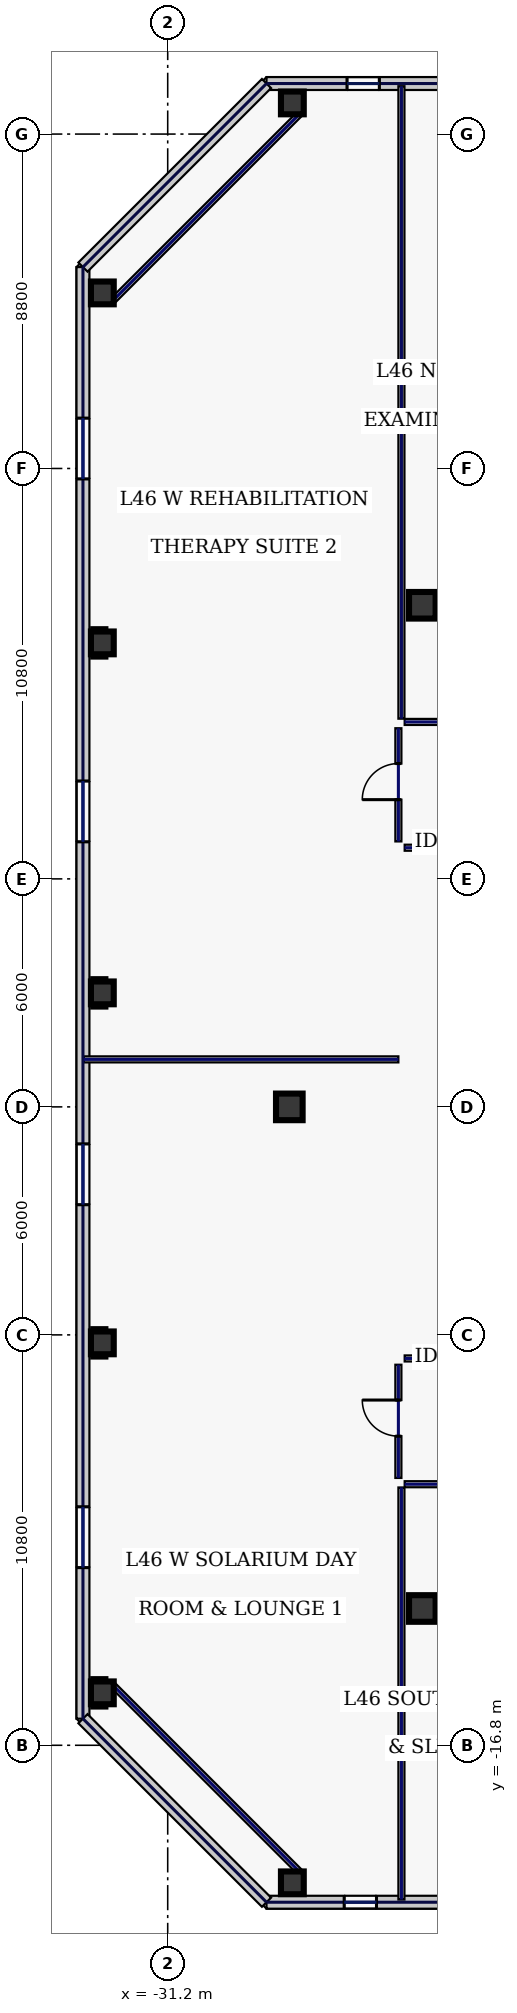
"""IFC4 building model, lengths in metres.
Left out: names, types, materials, properties, quantities, classifications, styles, units other than length and angle.
Written with IfcOpenShell. Run it as: python <this file> out.ifc"""

import sys

from ifc_helpers import new_model, si_unit, direction, frame, frame_2d, origin, origin_2d, place, context, subcontext, project, spatial, rectangle, hollow_rectangle, extrude, element, fill, save


model = new_model("IFC4")
c1 = context("Model", 3, precision=1e-05, world=origin(), true_north=direction((0.0, 1.0)))
c2 = subcontext(c1, "Body", "Model", "MODEL_VIEW")
j1 = project(units=[si_unit("LENGTHUNIT", "METRE"), si_unit("PLANEANGLEUNIT", "RADIAN")], contexts=[c1])
p1 = place(None, origin())
s1 = spatial("IfcSite", under=j1, at=p1, CompositionType="ELEMENT")
p2 = place(p1, origin())
s2 = spatial("IfcBuilding", under=s1, at=p2, CompositionType="ELEMENT")
p3 = place(p2, frame((0.0, 0.0, 200.2)))
s3 = spatial("IfcBuildingStorey", under=s2, at=p3, CompositionType="ELEMENT", Elevation=200.2)
for number, where, z_axis, x_axis in (
    (1, (-24.5, -13.2, 0.0), (0.0, 0.0, 1.0), (1.0, 0.0, 0.0)),
    (2, (-24.5, 13.2, 0.0), (0.0, 0.0, 1.0), (1.0, 0.0, 0.0)),
    (3, (-28.0, 0.0, 0.0), (0.0, 0.0, 1.0), (1.0, 0.0, 0.0)),
):
    element("IfcColumn", number, at=place(p3, frame(where, z_axis=z_axis, x_axis=x_axis)), inside=s3, PredefinedType="COLUMN", context=c2, shape_type="SweptSolid", body=[
        extrude(hollow_rectangle(XDim=0.7, YDim=0.7, WallThickness=0.032, at=origin_2d()), origin(), (0.0, 0.0, 1.0), 3.74),
    ])
for number, where, z_axis, x_axis in (
    (4, (-27.92, -20.42, 0.0), (0.0, 0.0, 1.0), (1.0, 0.0, 0.0)),
    (5, (-27.92, 26.42, 0.0), (0.0, 0.0, 1.0), (1.0, 0.0, 0.0)),
    (6, (-32.92, 21.42, 0.0), (0.0, 0.0, 1.0), (1.0, 0.0, 0.0)),
    (7, (-32.92, 12.21, 0.0), (0.0, 0.0, 1.0), (1.0, 0.0, 0.0)),
    (8, (-32.92, 3.0, 0.0), (0.0, 0.0, 1.0), (1.0, 0.0, 0.0)),
    (9, (-32.92, -6.21, 0.0), (0.0, 0.0, 1.0), (1.0, 0.0, 0.0)),
    (10, (-32.92, -15.42, 0.0), (0.0, 0.0, 1.0), (1.0, 0.0, 0.0)),
):
    element("IfcColumn", number, at=place(p3, frame(where, z_axis=z_axis, x_axis=x_axis)), inside=s3, PredefinedType="COLUMN", context=c2, shape_type="SweptSolid", body=[
        extrude(hollow_rectangle(XDim=0.6, YDim=0.6, WallThickness=0.028, at=origin_2d()), origin(), (0.0, 0.0, 1.0), 3.74),
    ])
p4 = place(p3, frame((-28.6, -20.93, 0.0), z_axis=(0.0, 0.0, 1.0), x_axis=(1.0, 0.0, 0.0)))
e11 = element("IfcWall", 11, at=p4, inside=s3, PredefinedType="STANDARD", context=c2, shape_type="SweptSolid", body=[
    extrude(rectangle(XDim=19.937, YDim=0.34, at=frame_2d((9.969, 0.0))), origin(), (0.0, 0.0, 1.0), 3.74),
])
p5 = place(p4, frame((2.044, 0.0, 0.8)))
e12 = element("IfcOpeningElement", 12, at=p5, cuts=e11, PredefinedType="OPENING", context=c2, shape_type="SweptSolid", body=[
    extrude(rectangle(XDim=0.85, YDim=1.85, at=frame_2d((0.425, 0.925))), frame((0.0, 0.18, 0.0), z_axis=(0.0, -1.0, 0.0), x_axis=(1.0, 0.0, 0.0)), (0.0, 0.0, 1.0), 0.36),
])
p6 = place(p4, frame((6.029, 0.0, 0.8)))
e13 = element("IfcOpeningElement", 13, at=p6, cuts=e11, PredefinedType="OPENING", context=c2, shape_type="SweptSolid", body=[
    extrude(rectangle(XDim=0.85, YDim=1.85, at=frame_2d((0.425, 0.925))), frame((0.0, 0.18, 0.0), z_axis=(0.0, -1.0, 0.0), x_axis=(1.0, 0.0, 0.0)), (0.0, 0.0, 1.0), 0.36),
])
p7 = place(p4, frame((10.707, 0.0, 0.8)))
e14 = element("IfcOpeningElement", 14, at=p7, cuts=e11, PredefinedType="OPENING", context=c2, shape_type="SweptSolid", body=[
    extrude(rectangle(XDim=1.95, YDim=2.1, at=frame_2d((0.975, 1.05))), frame((0.0, 0.18, 0.0), z_axis=(0.0, -1.0, 0.0), x_axis=(1.0, 0.0, 0.0)), (0.0, 0.0, 1.0), 0.36),
])
p8 = place(p3, frame((-8.663, 26.93, 0.0), z_axis=(0.0, 0.0, 1.0), x_axis=(-1.0, 0.0, 0.0)))
e15 = element("IfcWall", 15, at=p8, inside=s3, PredefinedType="STANDARD", context=c2, shape_type="SweptSolid", body=[
    extrude(rectangle(XDim=19.937, YDim=0.34, at=frame_2d((9.969, 0.0))), origin(), (0.0, 0.0, 1.0), 3.74),
])
p9 = place(p8, frame((16.968, 0.0, 0.7)))
e16 = element("IfcOpeningElement", 16, at=p9, cuts=e15, PredefinedType="OPENING", context=c2, shape_type="SweptSolid", body=[
    extrude(rectangle(XDim=0.85, YDim=1.85, at=frame_2d((0.425, 0.925))), frame((0.0, 0.18, 0.0), z_axis=(0.0, -1.0, 0.0), x_axis=(1.0, 0.0, 0.0)), (0.0, 0.0, 1.0), 0.36),
])
p10 = place(p8, frame((12.983, 0.0, 0.7)))
e17 = element("IfcOpeningElement", 17, at=p10, cuts=e15, PredefinedType="OPENING", context=c2, shape_type="SweptSolid", body=[
    extrude(rectangle(XDim=0.85, YDim=1.85, at=frame_2d((0.425, 0.925))), frame((0.0, 0.18, 0.0), z_axis=(0.0, -1.0, 0.0), x_axis=(1.0, 0.0, 0.0)), (0.0, 0.0, 1.0), 0.36),
])
p11 = place(p8, frame((7.355, 0.0, 0.7)))
e18 = element("IfcOpeningElement", 18, at=p11, cuts=e15, PredefinedType="OPENING", context=c2, shape_type="SweptSolid", body=[
    extrude(rectangle(XDim=1.8, YDim=2.2, at=frame_2d((0.9, 1.1))), frame((0.0, 0.18, 0.0), z_axis=(0.0, -1.0, 0.0), x_axis=(1.0, 0.0, 0.0)), (0.0, 0.0, 1.0), 0.36),
])
p12 = place(p3, frame((-33.43, 22.1, 0.0), z_axis=(0.0, 0.0, 1.0), x_axis=(0.0, -1.0, 0.0)))
e19 = element("IfcWall", 19, at=p12, inside=s3, PredefinedType="STANDARD", context=c2, shape_type="SweptSolid", body=[
    extrude(rectangle(XDim=38.2, YDim=0.34, at=frame_2d((19.1, 0.0))), origin(), (0.0, 0.0, 1.0), 3.74),
])
p13 = place(p12, frame((3.975, 0.0, 0.58)))
e20 = element("IfcOpeningElement", 20, at=p13, cuts=e19, PredefinedType="OPENING", context=c2, shape_type="SweptSolid", body=[
    extrude(rectangle(XDim=1.6, YDim=2.3, at=frame_2d((0.8, 1.15))), frame((0.0, 0.18, 0.0), z_axis=(0.0, -1.0, 0.0), x_axis=(1.0, 0.0, 0.0)), (0.0, 0.0, 1.0), 0.36),
])
p14 = place(p12, frame((13.525, 0.0, 0.58)))
e21 = element("IfcOpeningElement", 21, at=p14, cuts=e19, PredefinedType="OPENING", context=c2, shape_type="SweptSolid", body=[
    extrude(rectangle(XDim=1.6, YDim=2.3, at=frame_2d((0.8, 1.15))), frame((0.0, 0.18, 0.0), z_axis=(0.0, -1.0, 0.0), x_axis=(1.0, 0.0, 0.0)), (0.0, 0.0, 1.0), 0.36),
])
p15 = place(p12, frame((23.075, 0.0, 0.58)))
e22 = element("IfcOpeningElement", 22, at=p15, cuts=e19, PredefinedType="OPENING", context=c2, shape_type="SweptSolid", body=[
    extrude(rectangle(XDim=1.6, YDim=2.3, at=frame_2d((0.8, 1.15))), frame((0.0, 0.18, 0.0), z_axis=(0.0, -1.0, 0.0), x_axis=(1.0, 0.0, 0.0)), (0.0, 0.0, 1.0), 0.36),
])
p16 = place(p12, frame((32.625, 0.0, 0.58)))
e23 = element("IfcOpeningElement", 23, at=p16, cuts=e19, PredefinedType="OPENING", context=c2, shape_type="SweptSolid", body=[
    extrude(rectangle(XDim=1.6, YDim=2.3, at=frame_2d((0.8, 1.15))), frame((0.0, 0.18, 0.0), z_axis=(0.0, -1.0, 0.0), x_axis=(1.0, 0.0, 0.0)), (0.0, 0.0, 1.0), 0.36),
])
for number, where, z_axis, x_axis in (
    (24, (-28.6, 26.93, 0.0), (0.0, 0.0, 1.0), (-0.707, -0.707, 0.0)),
    (25, (-33.43, -16.1, 0.0), (0.0, 0.0, 1.0), (0.707, -0.707, 0.0)),
):
    element("IfcWall", number, at=place(p3, frame(where, z_axis=z_axis, x_axis=x_axis)), inside=s3, PredefinedType="STANDARD", context=c2, shape_type="SweptSolid", body=[
        extrude(rectangle(XDim=6.83, YDim=0.34, at=frame_2d((3.415, 0.0))), origin(), (0.0, 0.0, 1.0), 3.74),
    ])
for number, where, z_axis, x_axis in (
    (26, (-27.68, 26.18, 0.0), (0.0, 0.0, 1.0), (-0.707, -0.707, 0.0)),
    (27, (-32.68, -15.18, 0.0), (0.0, 0.0, 1.0), (0.707, -0.707, 0.0)),
):
    element("IfcWall", number, at=place(p3, frame(where, z_axis=z_axis, x_axis=x_axis)), inside=s3, PredefinedType="PARTITIONING", context=c2, shape_type="SweptSolid", body=[
        extrude(rectangle(XDim=7.071, YDim=0.16, at=frame_2d((3.536, 0.0))), origin(), (0.0, 0.0, 1.0), 3.74),
    ])
p17 = place(p3, frame((-25.13, -9.765, 0.0), z_axis=(0.0, 0.0, 1.0), x_axis=(0.0, 1.0, 0.0)))
e28 = element("IfcWall", 28, at=p17, inside=s3, PredefinedType="PARTITIONING", context=c2, shape_type="SweptSolid", body=[
    extrude(rectangle(XDim=2.98, YDim=0.16, at=frame_2d((1.49, 0.0))), origin(), (0.0, 0.0, 1.0), 3.74),
])
p18 = place(p17, frame((1.1, 0.0, 0.0)))
e29 = element("IfcOpeningElement", 29, at=p18, cuts=e28, PredefinedType="OPENING", context=c2, shape_type="SweptSolid", body=[
    extrude(rectangle(XDim=0.95, YDim=2.2, at=frame_2d((0.475, 1.1))), frame((0.0, 0.09, 0.0), z_axis=(0.0, -1.0, 0.0), x_axis=(1.0, 0.0, 0.0)), (0.0, 0.0, 1.0), 0.18),
])
for number, where, z_axis, x_axis in (
    (30, (-24.965, -6.62, 0.0), (0.0, 0.0, 1.0), (1.0, 0.0, 0.0)),
    (31, (-10.63, 6.82, 0.0), (0.0, 0.0, 1.0), (-1.0, 0.0, 0.0)),
):
    element("IfcWall", number, at=place(p3, frame(where, z_axis=z_axis, x_axis=x_axis)), inside=s3, PredefinedType="PARTITIONING", context=c2, shape_type="SweptSolid", body=[
        extrude(rectangle(XDim=14.335, YDim=0.16, at=frame_2d((7.167, 0.0))), origin(), (0.0, 0.0, 1.0), 3.74),
    ])
p19 = place(p3, frame((-25.13, 6.985, 0.0), z_axis=(0.0, 0.0, 1.0), x_axis=(0.0, 1.0, 0.0)))
e32 = element("IfcWall", 32, at=p19, inside=s3, PredefinedType="PARTITIONING", context=c2, shape_type="SweptSolid", body=[
    extrude(rectangle(XDim=2.98, YDim=0.16, at=frame_2d((1.49, 0.0))), origin(), (0.0, 0.0, 1.0), 3.74),
])
p20 = place(p19, frame((1.1, 0.0, 0.0)))
e33 = element("IfcOpeningElement", 33, at=p20, cuts=e32, PredefinedType="OPENING", context=c2, shape_type="SweptSolid", body=[
    extrude(rectangle(XDim=0.95, YDim=2.2, at=frame_2d((0.475, 1.1))), frame((0.0, 0.09, 0.0), z_axis=(0.0, -1.0, 0.0), x_axis=(1.0, 0.0, 0.0)), (0.0, 0.0, 1.0), 0.18),
])
p21 = place(p3, frame((-24.965, 10.13, 0.0), z_axis=(0.0, 0.0, 1.0), x_axis=(1.0, 0.0, 0.0)))
e34 = element("IfcWall", 34, at=p21, inside=s3, PredefinedType="PARTITIONING", context=c2, shape_type="SweptSolid", body=[
    extrude(rectangle(XDim=49.93, YDim=0.16, at=frame_2d((24.965, 0.0))), origin(), (0.0, 0.0, 1.0), 3.74),
])
p22 = place(p21, frame((2.044, 0.0, 0.0)))
e35 = element("IfcOpeningElement", 35, at=p22, cuts=e34, PredefinedType="OPENING", context=c2, shape_type="SweptSolid", body=[
    extrude(rectangle(XDim=0.95, YDim=2.2, at=frame_2d((0.475, 1.1))), frame((0.0, 0.09, 0.0), z_axis=(0.0, -1.0, 0.0), x_axis=(1.0, 0.0, 0.0)), (0.0, 0.0, 1.0), 0.18),
])
p23 = place(p21, frame((7.775, 0.0, 0.0)))
e36 = element("IfcOpeningElement", 36, at=p23, cuts=e34, PredefinedType="OPENING", context=c2, shape_type="SweptSolid", body=[
    extrude(rectangle(XDim=0.95, YDim=2.2, at=frame_2d((0.475, 1.1))), frame((0.0, 0.09, 0.0), z_axis=(0.0, -1.0, 0.0), x_axis=(1.0, 0.0, 0.0)), (0.0, 0.0, 1.0), 0.18),
])
p24 = place(p21, frame((15.275, 0.0, 0.0)))
e37 = element("IfcOpeningElement", 37, at=p24, cuts=e34, PredefinedType="OPENING", context=c2, shape_type="SweptSolid", body=[
    extrude(rectangle(XDim=0.95, YDim=2.2, at=frame_2d((0.475, 1.1))), frame((0.0, 0.09, 0.0), z_axis=(0.0, -1.0, 0.0), x_axis=(1.0, 0.0, 0.0)), (0.0, 0.0, 1.0), 0.18),
])
p25 = place(p21, frame((21.475, 0.0, 0.0)))
e38 = element("IfcOpeningElement", 38, at=p25, cuts=e34, PredefinedType="OPENING", context=c2, shape_type="SweptSolid", body=[
    extrude(rectangle(XDim=1.3, YDim=2.2, at=frame_2d((0.65, 1.1))), frame((0.0, 0.09, 0.0), z_axis=(0.0, -1.0, 0.0), x_axis=(1.0, 0.0, 0.0)), (0.0, 0.0, 1.0), 0.18),
])
p26 = place(p21, frame((26.15, 0.0, 0.0)))
e39 = element("IfcOpeningElement", 39, at=p26, cuts=e34, PredefinedType="OPENING", context=c2, shape_type="SweptSolid", body=[
    extrude(rectangle(XDim=0.95, YDim=2.2, at=frame_2d((0.475, 1.1))), frame((0.0, 0.09, 0.0), z_axis=(0.0, -1.0, 0.0), x_axis=(1.0, 0.0, 0.0)), (0.0, 0.0, 1.0), 0.18),
])
p27 = place(p21, frame((32.575, 0.0, 0.0)))
e40 = element("IfcOpeningElement", 40, at=p27, cuts=e34, PredefinedType="OPENING", context=c2, shape_type="SweptSolid", body=[
    extrude(rectangle(XDim=0.95, YDim=2.2, at=frame_2d((0.475, 1.1))), frame((0.0, 0.09, 0.0), z_axis=(0.0, -1.0, 0.0), x_axis=(1.0, 0.0, 0.0)), (0.0, 0.0, 1.0), 0.18),
])
p28 = place(p21, frame((40.675, 0.0, 0.0)))
e41 = element("IfcOpeningElement", 41, at=p28, cuts=e34, PredefinedType="OPENING", context=c2, shape_type="SweptSolid", body=[
    extrude(rectangle(XDim=0.95, YDim=2.2, at=frame_2d((0.475, 1.1))), frame((0.0, 0.09, 0.0), z_axis=(0.0, -1.0, 0.0), x_axis=(1.0, 0.0, 0.0)), (0.0, 0.0, 1.0), 0.18),
])
p29 = place(p21, frame((46.631, 0.0, 0.0)))
e42 = element("IfcOpeningElement", 42, at=p29, cuts=e34, PredefinedType="OPENING", context=c2, shape_type="SweptSolid", body=[
    extrude(rectangle(XDim=1.3, YDim=2.2, at=frame_2d((0.65, 1.1))), frame((0.0, 0.09, 0.0), z_axis=(0.0, -1.0, 0.0), x_axis=(1.0, 0.0, 0.0)), (0.0, 0.0, 1.0), 0.18),
])
p30 = place(p3, frame((24.965, -9.93, 0.0), z_axis=(0.0, 0.0, 1.0), x_axis=(-1.0, 0.0, 0.0)))
e43 = element("IfcWall", 43, at=p30, inside=s3, PredefinedType="PARTITIONING", context=c2, shape_type="SweptSolid", body=[
    extrude(rectangle(XDim=49.93, YDim=0.16, at=frame_2d((24.965, 0.0))), origin(), (0.0, 0.0, 1.0), 3.74),
])
p31 = place(p30, frame((47.106, 0.0, 0.0)))
e44 = element("IfcOpeningElement", 44, at=p31, cuts=e43, PredefinedType="OPENING", context=c2, shape_type="SweptSolid", body=[
    extrude(rectangle(XDim=0.95, YDim=2.2, at=frame_2d((0.475, 1.1))), frame((0.0, 0.09, 0.0), z_axis=(0.0, -1.0, 0.0), x_axis=(1.0, 0.0, 0.0)), (0.0, 0.0, 1.0), 0.18),
])
p32 = place(p30, frame((41.375, 0.0, 0.0)))
e45 = element("IfcOpeningElement", 45, at=p32, cuts=e43, PredefinedType="OPENING", context=c2, shape_type="SweptSolid", body=[
    extrude(rectangle(XDim=0.95, YDim=2.2, at=frame_2d((0.475, 1.1))), frame((0.0, 0.09, 0.0), z_axis=(0.0, -1.0, 0.0), x_axis=(1.0, 0.0, 0.0)), (0.0, 0.0, 1.0), 0.18),
])
p33 = place(p30, frame((33.875, 0.0, 0.0)))
e46 = element("IfcOpeningElement", 46, at=p33, cuts=e43, PredefinedType="OPENING", context=c2, shape_type="SweptSolid", body=[
    extrude(rectangle(XDim=0.95, YDim=2.2, at=frame_2d((0.475, 1.1))), frame((0.0, 0.09, 0.0), z_axis=(0.0, -1.0, 0.0), x_axis=(1.0, 0.0, 0.0)), (0.0, 0.0, 1.0), 0.18),
])
p34 = place(p30, frame((25.3, 0.0, 0.0)))
e47 = element("IfcOpeningElement", 47, at=p34, cuts=e43, PredefinedType="OPENING", context=c2, shape_type="SweptSolid", body=[
    extrude(rectangle(XDim=1.3, YDim=2.2, at=frame_2d((0.65, 1.1))), frame((0.0, 0.09, 0.0), z_axis=(0.0, -1.0, 0.0), x_axis=(1.0, 0.0, 0.0)), (0.0, 0.0, 1.0), 0.18),
])
p35 = place(p30, frame((16.4, 0.0, 0.0)))
e48 = element("IfcOpeningElement", 48, at=p35, cuts=e43, PredefinedType="OPENING", context=c2, shape_type="SweptSolid", body=[
    extrude(rectangle(XDim=1.3, YDim=2.2, at=frame_2d((0.65, 1.1))), frame((0.0, 0.09, 0.0), z_axis=(0.0, -1.0, 0.0), x_axis=(1.0, 0.0, 0.0)), (0.0, 0.0, 1.0), 0.18),
])
p36 = place(p30, frame((8.475, 0.0, 0.0)))
e49 = element("IfcOpeningElement", 49, at=p36, cuts=e43, PredefinedType="OPENING", context=c2, shape_type="SweptSolid", body=[
    extrude(rectangle(XDim=0.95, YDim=2.2, at=frame_2d((0.475, 1.1))), frame((0.0, 0.09, 0.0), z_axis=(0.0, -1.0, 0.0), x_axis=(1.0, 0.0, 0.0)), (0.0, 0.0, 1.0), 0.18),
])
p37 = place(p30, frame((2.344, 0.0, 0.0)))
e50 = element("IfcOpeningElement", 50, at=p37, cuts=e43, PredefinedType="OPENING", context=c2, shape_type="SweptSolid", body=[
    extrude(rectangle(XDim=0.95, YDim=2.2, at=frame_2d((0.475, 1.1))), frame((0.0, 0.09, 0.0), z_axis=(0.0, -1.0, 0.0), x_axis=(1.0, 0.0, 0.0)), (0.0, 0.0, 1.0), 0.18),
])
p38 = place(p3, frame((-25.05, 10.215, 0.0), z_axis=(0.0, 0.0, 1.0), x_axis=(0.0, 1.0, 0.0)))
e51 = element("IfcWall", 51, at=p38, inside=s3, PredefinedType="PARTITIONING", context=c2, shape_type="SweptSolid", body=[
    extrude(rectangle(XDim=16.645, YDim=0.16, at=frame_2d((8.323, 0.0))), origin(), (0.0, 0.0, 1.0), 3.285),
])
p39 = place(p3, frame((-25.05, -20.86, 0.0), z_axis=(0.0, 0.0, 1.0), x_axis=(0.0, 1.0, 0.0)))
e52 = element("IfcWall", 52, at=p39, inside=s3, PredefinedType="PARTITIONING", context=c2, shape_type="SweptSolid", body=[
    extrude(rectangle(XDim=10.845, YDim=0.16, at=frame_2d((5.423, 0.0))), origin(), (0.0, 0.0, 1.0), 3.74),
])
p40 = place(p3, frame((-33.41, 1.25, 0.0), z_axis=(0.0, 0.0, 1.0), x_axis=(1.0, 0.0, 0.0)))
e53 = element("IfcWall", 53, at=p40, inside=s3, PredefinedType="PARTITIONING", context=c2, shape_type="SweptSolid", body=[
    extrude(rectangle(XDim=8.28, YDim=0.16, at=frame_2d((4.14, 0.0))), origin(), (0.0, 0.0, 1.0), 3.74),
])
p41 = place(p5, origin())
e54 = element("IfcWindow", 54, at=p41, inside=s3, PartitioningType="SINGLE_PANEL", PredefinedType="WINDOW", context=c2, shape_type="SweptSolid", body=[
    extrude(rectangle(XDim=0.85, YDim=1.85, at=frame_2d((0.425, 0.925))), frame((0.0, 0.03, 0.0), z_axis=(0.0, -1.0, 0.0), x_axis=(1.0, 0.0, 0.0)), (0.0, 0.0, 1.0), 0.06),
])
fill(e12, e54)
p42 = place(p9, origin())
e55 = element("IfcWindow", 55, at=p42, inside=s3, PartitioningType="SINGLE_PANEL", PredefinedType="WINDOW", context=c2, shape_type="SweptSolid", body=[
    extrude(rectangle(XDim=0.85, YDim=1.85, at=frame_2d((0.425, 0.925))), frame((0.0, 0.03, 0.0), z_axis=(0.0, -1.0, 0.0), x_axis=(1.0, 0.0, 0.0)), (0.0, 0.0, 1.0), 0.06),
])
fill(e16, e55)
p43 = place(p13, origin())
e56 = element("IfcWindow", 56, at=p43, inside=s3, PartitioningType="SINGLE_PANEL", PredefinedType="WINDOW", context=c2, shape_type="SweptSolid", body=[
    extrude(rectangle(XDim=1.6, YDim=2.3, at=frame_2d((0.8, 1.15))), frame((0.0, 0.03, 0.0), z_axis=(0.0, -1.0, 0.0), x_axis=(1.0, 0.0, 0.0)), (0.0, 0.0, 1.0), 0.06),
])
fill(e20, e56)
p44 = place(p14, origin())
e57 = element("IfcWindow", 57, at=p44, inside=s3, PartitioningType="SINGLE_PANEL", PredefinedType="WINDOW", context=c2, shape_type="SweptSolid", body=[
    extrude(rectangle(XDim=1.6, YDim=2.3, at=frame_2d((0.8, 1.15))), frame((0.0, 0.03, 0.0), z_axis=(0.0, -1.0, 0.0), x_axis=(1.0, 0.0, 0.0)), (0.0, 0.0, 1.0), 0.06),
])
fill(e21, e57)
p45 = place(p15, origin())
e58 = element("IfcWindow", 58, at=p45, inside=s3, PartitioningType="SINGLE_PANEL", PredefinedType="WINDOW", context=c2, shape_type="SweptSolid", body=[
    extrude(rectangle(XDim=1.6, YDim=2.3, at=frame_2d((0.8, 1.15))), frame((0.0, 0.03, 0.0), z_axis=(0.0, -1.0, 0.0), x_axis=(1.0, 0.0, 0.0)), (0.0, 0.0, 1.0), 0.06),
])
fill(e22, e58)
p46 = place(p16, origin())
e59 = element("IfcWindow", 59, at=p46, inside=s3, PartitioningType="SINGLE_PANEL", PredefinedType="WINDOW", context=c2, shape_type="SweptSolid", body=[
    extrude(rectangle(XDim=1.6, YDim=2.3, at=frame_2d((0.8, 1.15))), frame((0.0, 0.03, 0.0), z_axis=(0.0, -1.0, 0.0), x_axis=(1.0, 0.0, 0.0)), (0.0, 0.0, 1.0), 0.06),
])
fill(e23, e59)
p47 = place(p18, origin())
e60 = element("IfcDoor", 60, at=p47, inside=s3, OperationType="SINGLE_SWING_RIGHT", PredefinedType="DOOR", context=c2, shape_type="SweptSolid", body=[
    extrude(rectangle(XDim=0.95, YDim=2.2, at=frame_2d((0.475, 1.1))), frame((0.0, 0.025, 0.0), z_axis=(0.0, -1.0, 0.0), x_axis=(1.0, 0.0, 0.0)), (0.0, 0.0, 1.0), 0.05),
])
fill(e29, e60)
p48 = place(p20, origin())
e61 = element("IfcDoor", 61, at=p48, inside=s3, OperationType="SINGLE_SWING_LEFT", PredefinedType="DOOR", context=c2, shape_type="SweptSolid", body=[
    extrude(rectangle(XDim=0.95, YDim=2.2, at=frame_2d((0.475, 1.1))), frame((0.0, 0.025, 0.0), z_axis=(0.0, -1.0, 0.0), x_axis=(1.0, 0.0, 0.0)), (0.0, 0.0, 1.0), 0.05),
])
fill(e33, e61)
save(model, sys.argv[1])
